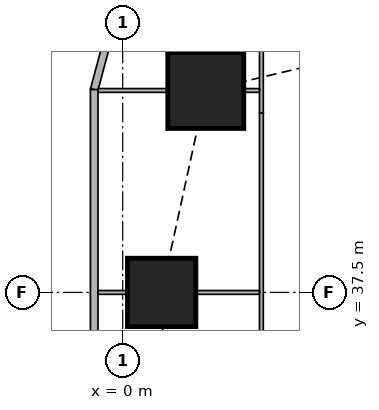
"""IFC4 building model, lengths in metres.
Left out: names, types, materials, properties, quantities, classifications, styles, units other than length and angle.
Written with IfcOpenShell. Run it as: python <this file> out.ifc"""

import sys

from ifc_helpers import new_model, si_unit, direction, frame, frame_2d, origin, origin_2d, place, context, subcontext, project, spatial, rectangle, extrude, element, fill, save


model = new_model("IFC4")
c1 = context("Model", 3, precision=1e-05, world=origin(), true_north=direction((0.0, 1.0)))
c2 = subcontext(c1, "Body", "Model", "MODEL_VIEW")
j1 = project(units=[si_unit("LENGTHUNIT", "METRE"), si_unit("PLANEANGLEUNIT", "RADIAN")], contexts=[c1])
p1 = place(None, origin())
s1 = spatial("IfcSite", under=j1, at=p1, CompositionType="ELEMENT")
p2 = place(p1, origin())
s2 = spatial("IfcBuilding", under=s1, at=p2, CompositionType="ELEMENT")
p3 = place(p2, frame((0.0, 0.0, 158.3)))
s3 = spatial("IfcBuildingStorey", under=s2, at=p3, CompositionType="ELEMENT", Elevation=158.3)
p4 = place(p3, frame((1.025, 37.5, 0.0), z_axis=(0.0, 0.0, 1.0), x_axis=(1.0, 0.0, 0.0)))
e1 = element("IfcColumn", 1, at=p4, inside=s3, PredefinedType="COLUMN", context=c2, shape_type="SweptSolid", body=[
    extrude(rectangle(XDim=1.8, YDim=1.8, at=origin_2d()), origin(), (0.0, 0.0, 1.0), 3.75),
])
p5 = place(p3, frame((2.186, 42.814, 0.0), z_axis=(0.0, 0.0, 1.0), x_axis=(1.0, 0.0, 0.0)))
e2 = element("IfcColumn", 2, at=p5, inside=s3, PredefinedType="COLUMN", context=c2, shape_type="SweptSolid", body=[
    extrude(rectangle(XDim=2.0, YDim=2.0, at=origin_2d()), origin(), (0.0, 0.0, 1.0), 3.75),
])
p6 = place(p3, frame((-0.358, 44.298, 0.0), z_axis=(0.0, 0.0, 1.0), x_axis=(-0.259168954497, -0.965832000415, 0.0)))
e3 = element("IfcWall", 3, at=p6, inside=s3, PredefinedType="SOLIDWALL", context=c2, shape_type="SweptSolid", body=[
    extrude(rectangle(XDim=1.513, YDim=0.2, at=frame_2d((0.756, 0.0))), origin(), (0.0, 0.0, 1.0), 3.5),
])
p7 = place(p3, frame((-0.75, 42.837, 0.0), z_axis=(0.0, 0.0, 1.0), x_axis=(0.0, -1.0, 0.0)))
e4 = element("IfcWall", 4, at=p7, inside=s3, PredefinedType="SOLIDWALL", context=c2, shape_type="SweptSolid", body=[
    extrude(rectangle(XDim=40.674, YDim=0.2, at=frame_2d((20.337, 0.0))), origin(), (0.0, 0.0, 1.0), 3.5),
])
p8 = place(p7, frame((1.78, 0.0, 0.9)))
e5 = element("IfcOpeningElement", 5, at=p8, cuts=e4, PredefinedType="OPENING", context=c2, shape_type="SweptSolid", body=[
    extrude(rectangle(XDim=1.8, YDim=1.5, at=frame_2d((0.9, 0.75))), frame((0.0, 0.11, 0.0), z_axis=(0.0, -1.0, 0.0), x_axis=(1.0, 0.0, 0.0)), (0.0, 0.0, 1.0), 0.22),
])
p9 = place(p7, frame((6.312, 0.0, 0.9)))
e6 = element("IfcOpeningElement", 6, at=p9, cuts=e4, PredefinedType="OPENING", context=c2, shape_type="SweptSolid", body=[
    extrude(rectangle(XDim=1.8, YDim=1.5, at=frame_2d((0.9, 0.75))), frame((0.0, 0.11, 0.0), z_axis=(0.0, -1.0, 0.0), x_axis=(1.0, 0.0, 0.0)), (0.0, 0.0, 1.0), 0.22),
])
p10 = place(p7, frame((10.062, 0.0, 0.9)))
e7 = element("IfcOpeningElement", 7, at=p10, cuts=e4, PredefinedType="OPENING", context=c2, shape_type="SweptSolid", body=[
    extrude(rectangle(XDim=1.8, YDim=1.5, at=frame_2d((0.9, 0.75))), frame((0.0, 0.11, 0.0), z_axis=(0.0, -1.0, 0.0), x_axis=(1.0, 0.0, 0.0)), (0.0, 0.0, 1.0), 0.22),
])
p11 = place(p7, frame((13.812, 0.0, 0.9)))
e8 = element("IfcOpeningElement", 8, at=p11, cuts=e4, PredefinedType="OPENING", context=c2, shape_type="SweptSolid", body=[
    extrude(rectangle(XDim=1.8, YDim=1.5, at=frame_2d((0.9, 0.75))), frame((0.0, 0.11, 0.0), z_axis=(0.0, -1.0, 0.0), x_axis=(1.0, 0.0, 0.0)), (0.0, 0.0, 1.0), 0.22),
])
p12 = place(p7, frame((17.562, 0.0, 0.9)))
e9 = element("IfcOpeningElement", 9, at=p12, cuts=e4, PredefinedType="OPENING", context=c2, shape_type="SweptSolid", body=[
    extrude(rectangle(XDim=1.8, YDim=1.5, at=frame_2d((0.9, 0.75))), frame((0.0, 0.11, 0.0), z_axis=(0.0, -1.0, 0.0), x_axis=(1.0, 0.0, 0.0)), (0.0, 0.0, 1.0), 0.22),
])
p13 = place(p7, frame((21.312, 0.0, 0.9)))
e10 = element("IfcOpeningElement", 10, at=p13, cuts=e4, PredefinedType="OPENING", context=c2, shape_type="SweptSolid", body=[
    extrude(rectangle(XDim=1.8, YDim=1.5, at=frame_2d((0.9, 0.75))), frame((0.0, 0.11, 0.0), z_axis=(0.0, -1.0, 0.0), x_axis=(1.0, 0.0, 0.0)), (0.0, 0.0, 1.0), 0.22),
])
p14 = place(p7, frame((25.062, 0.0, 0.9)))
e11 = element("IfcOpeningElement", 11, at=p14, cuts=e4, PredefinedType="OPENING", context=c2, shape_type="SweptSolid", body=[
    extrude(rectangle(XDim=1.8, YDim=1.5, at=frame_2d((0.9, 0.75))), frame((0.0, 0.11, 0.0), z_axis=(0.0, -1.0, 0.0), x_axis=(1.0, 0.0, 0.0)), (0.0, 0.0, 1.0), 0.22),
])
p15 = place(p7, frame((28.812, 0.0, 0.9)))
e12 = element("IfcOpeningElement", 12, at=p15, cuts=e4, PredefinedType="OPENING", context=c2, shape_type="SweptSolid", body=[
    extrude(rectangle(XDim=1.8, YDim=1.5, at=frame_2d((0.9, 0.75))), frame((0.0, 0.11, 0.0), z_axis=(0.0, -1.0, 0.0), x_axis=(1.0, 0.0, 0.0)), (0.0, 0.0, 1.0), 0.22),
])
p16 = place(p7, frame((32.562, 0.0, 0.9)))
e13 = element("IfcOpeningElement", 13, at=p16, cuts=e4, PredefinedType="OPENING", context=c2, shape_type="SweptSolid", body=[
    extrude(rectangle(XDim=1.8, YDim=1.5, at=frame_2d((0.9, 0.75))), frame((0.0, 0.11, 0.0), z_axis=(0.0, -1.0, 0.0), x_axis=(1.0, 0.0, 0.0)), (0.0, 0.0, 1.0), 0.22),
])
p17 = place(p7, frame((37.094, 0.0, 0.9)))
e14 = element("IfcOpeningElement", 14, at=p17, cuts=e4, PredefinedType="OPENING", context=c2, shape_type="SweptSolid", body=[
    extrude(rectangle(XDim=1.8, YDim=1.5, at=frame_2d((0.9, 0.75))), frame((0.0, 0.11, 0.0), z_axis=(0.0, -1.0, 0.0), x_axis=(1.0, 0.0, 0.0)), (0.0, 0.0, 1.0), 0.22),
])
p18 = place(p3, frame((3.65, 30.0, 0.0), z_axis=(0.0, 0.0, 1.0), x_axis=(0.0, 1.0, 0.0)))
e15 = element("IfcWall", 15, at=p18, inside=s3, PredefinedType="PARTITIONING", context=c2, shape_type="SweptSolid", body=[
    extrude(rectangle(XDim=12.224, YDim=0.1, at=frame_2d((6.112, 0.0))), origin(), (0.0, 0.0, 1.0), 3.5),
])
p19 = place(p18, frame((0.2, 0.0, 0.0)))
e16 = element("IfcOpeningElement", 16, at=p19, cuts=e15, PredefinedType="OPENING", context=c2, shape_type="SweptSolid", body=[
    extrude(rectangle(XDim=0.9, YDim=2.1, at=frame_2d((0.45, 1.05))), frame((0.0, 0.06, 0.0), z_axis=(0.0, -1.0, 0.0), x_axis=(1.0, 0.0, 0.0)), (0.0, 0.0, 1.0), 0.12),
])
p20 = place(p18, frame((3.95, 0.0, 0.0)))
e17 = element("IfcOpeningElement", 17, at=p20, cuts=e15, PredefinedType="OPENING", context=c2, shape_type="SweptSolid", body=[
    extrude(rectangle(XDim=0.9, YDim=2.1, at=frame_2d((0.45, 1.05))), frame((0.0, 0.06, 0.0), z_axis=(0.0, -1.0, 0.0), x_axis=(1.0, 0.0, 0.0)), (0.0, 0.0, 1.0), 0.12),
])
p21 = place(p18, frame((7.7, 0.0, 0.0)))
e18 = element("IfcOpeningElement", 18, at=p21, cuts=e15, PredefinedType="OPENING", context=c2, shape_type="SweptSolid", body=[
    extrude(rectangle(XDim=0.9, YDim=2.1, at=frame_2d((0.45, 1.05))), frame((0.0, 0.06, 0.0), z_axis=(0.0, -1.0, 0.0), x_axis=(1.0, 0.0, 0.0)), (0.0, 0.0, 1.0), 0.12),
])
p22 = place(p3, frame((3.65, 42.224, 0.0), z_axis=(0.0, 0.0, 1.0), x_axis=(0.0, 1.0, 0.0)))
e19 = element("IfcWall", 19, at=p22, inside=s3, PredefinedType="PARTITIONING", context=c2, shape_type="SweptSolid", body=[
    extrude(rectangle(XDim=1.873, YDim=0.1, at=frame_2d((0.937, 0.0))), origin(), (0.0, 0.0, 1.0), 2.1),
])
p23 = place(p3, frame((-0.65, 37.5, 0.0), z_axis=(0.0, 0.0, 1.0), x_axis=(1.0, 0.0, 0.0)))
e20 = element("IfcWall", 20, at=p23, inside=s3, PredefinedType="PARTITIONING", context=c2, shape_type="SweptSolid", body=[
    extrude(rectangle(XDim=0.774, YDim=0.1, at=frame_2d((0.387, 0.0))), origin(), (0.0, 0.0, 1.0), 3.5),
])
p24 = place(p3, frame((1.926, 37.5, 0.0), z_axis=(0.0, 0.0, 1.0), x_axis=(1.0, 0.0, 0.0)))
e21 = element("IfcWall", 21, at=p24, inside=s3, PredefinedType="PARTITIONING", context=c2, shape_type="SweptSolid", body=[
    extrude(rectangle(XDim=1.674, YDim=0.1, at=frame_2d((0.837, 0.0))), origin(), (0.0, 0.0, 1.0), 2.1),
])
p25 = place(p3, frame((-0.65, 42.814, 0.0), z_axis=(0.0, 0.0, 1.0), x_axis=(1.0, 0.0, 0.0)))
e22 = element("IfcWall", 22, at=p25, inside=s3, PredefinedType="PARTITIONING", context=c2, shape_type="SweptSolid", body=[
    extrude(rectangle(XDim=1.835, YDim=0.1, at=frame_2d((0.917, 0.0))), origin(), (0.0, 0.0, 1.0), 3.5),
])
p26 = place(p3, frame((3.187, 42.814, 0.0), z_axis=(0.0, 0.0, 1.0), x_axis=(1.0, 0.0, 0.0)))
e23 = element("IfcWall", 23, at=p26, inside=s3, PredefinedType="PARTITIONING", context=c2, shape_type="SweptSolid", body=[
    extrude(rectangle(XDim=0.413, YDim=0.1, at=frame_2d((0.207, 0.0))), origin(), (0.0, 0.0, 1.0), 2.1),
])
p27 = place(p8, origin())
e24 = element("IfcWindow", 24, at=p27, inside=s3, PartitioningType="SINGLE_PANEL", PredefinedType="WINDOW", context=c2, shape_type="SweptSolid", body=[
    extrude(rectangle(XDim=1.8, YDim=1.5, at=frame_2d((0.9, 0.75))), frame((0.0, 0.03, 0.0), z_axis=(0.0, -1.0, 0.0), x_axis=(1.0, 0.0, 0.0)), (0.0, 0.0, 1.0), 0.06),
])
fill(e5, e24)
p28 = place(p9, origin())
e25 = element("IfcWindow", 25, at=p28, inside=s3, PartitioningType="SINGLE_PANEL", PredefinedType="WINDOW", context=c2, shape_type="SweptSolid", body=[
    extrude(rectangle(XDim=1.8, YDim=1.5, at=frame_2d((0.9, 0.75))), frame((0.0, 0.03, 0.0), z_axis=(0.0, -1.0, 0.0), x_axis=(1.0, 0.0, 0.0)), (0.0, 0.0, 1.0), 0.06),
])
fill(e6, e25)
p29 = place(p21, origin())
e26 = element("IfcDoor", 26, at=p29, inside=s3, OperationType="SINGLE_SWING_LEFT", PredefinedType="DOOR", context=c2, shape_type="SweptSolid", body=[
    extrude(rectangle(XDim=0.9, YDim=2.1, at=frame_2d((0.45, 1.05))), frame((0.0, 0.025, 0.0), z_axis=(0.0, -1.0, 0.0), x_axis=(1.0, 0.0, 0.0)), (0.0, 0.0, 1.0), 0.05),
])
fill(e18, e26)
save(model, sys.argv[1])
